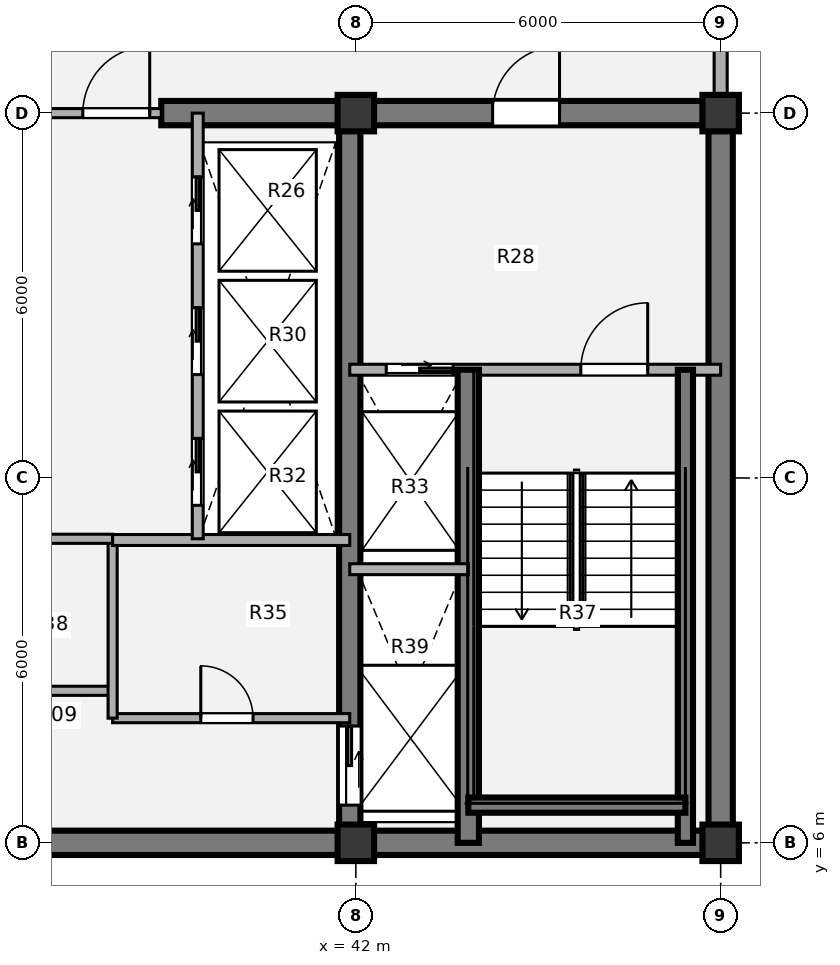
"""IFC4 building model, lengths in metres.
Left out: names, types, materials, properties, quantities, classifications, styles, units other than length and angle.
Written with IfcOpenShell. Run it as: python <this file> out.ifc"""

import sys

from ifc_helpers import new_model, si_unit, direction, frame, frame_2d, origin, origin_2d, place, context, subcontext, project, spatial, rectangle, extrude, source, transform, mapped, element, fill, save


model = new_model("IFC4")
c1 = context("Model", 3, precision=1e-05, world=origin(), true_north=direction((0.0, 1.0)))
c2 = subcontext(c1, "Body", "Model", "MODEL_VIEW")
j1 = project(units=[si_unit("LENGTHUNIT", "METRE"), si_unit("PLANEANGLEUNIT", "RADIAN")], contexts=[c1])
p1 = place(None, origin())
s1 = spatial("IfcSite", under=j1, at=p1, CompositionType="ELEMENT")
p2 = place(p1, origin())
s2 = spatial("IfcBuilding", under=s1, at=p2, CompositionType="ELEMENT")
p3 = place(p2, frame((0.0, 0.0, 260.82)))
s3 = spatial("IfcBuildingStorey", under=s2, at=p3, CompositionType="ELEMENT", Elevation=260.82)
m1 = source(origin(), c2, "Body", "SweptSolid", [
    extrude(rectangle(XDim=0.6, YDim=0.6, at=origin_2d()), origin(), (0.0, 0.0, 1.0), 3.78),
])
for number, where, z_axis, x_axis in (
    (1, (42.0, 6.0, 0.0), (0.0, 0.0, 1.0), (1.0, 0.0, 0.0)),
    (2, (48.0, 6.0, 0.0), (0.0, 0.0, 1.0), (1.0, 0.0, 0.0)),
    (3, (42.0, 18.0, 0.0), (0.0, 0.0, 1.0), (1.0, 0.0, 0.0)),
    (4, (48.0, 18.0, 0.0), (0.0, 0.0, 1.0), (1.0, 0.0, 0.0)),
):
    element("IfcColumn", number, at=place(p3, frame(where, z_axis=z_axis, x_axis=x_axis)), inside=s3, PredefinedType="COLUMN", context=c2, shape_type="MappedRepresentation", body=[
        mapped(m1, transform((0.0, 0.0, 0.0), x_axis=(1.0, 0.0, 0.0), y_axis=(0.0, 1.0, 0.0), z_axis=(0.0, 0.0, 1.0), scale=1.0)),
    ])
p4 = place(p3, frame((48.2, 6.0, 0.0), z_axis=(0.0, 0.0, 1.0), x_axis=(-1.0, 0.0, 0.0)))
e5 = element("IfcWall", 5, at=p4, inside=s3, PredefinedType="SHEAR", context=c2, shape_type="SweptSolid", body=[
    extrude(rectangle(XDim=24.4, YDim=0.4, at=frame_2d((12.2, 0.0))), origin(), (0.0, 0.0, 1.0), 3.78),
])
p5 = place(p3, frame((48.0, 18.0, 0.0), z_axis=(0.0, 0.0, 1.0), x_axis=(0.0, -1.0, 0.0)))
e6 = element("IfcWall", 6, at=p5, inside=s3, PredefinedType="SHEAR", context=c2, shape_type="SweptSolid", body=[
    extrude(rectangle(XDim=12.0, YDim=0.4, at=frame_2d((6.0, 0.0))), origin(), (0.0, 0.0, 1.0), 3.78),
])
p6 = place(p3, frame((38.8, 18.0, 0.0), z_axis=(0.0, 0.0, 1.0), x_axis=(1.0, 0.0, 0.0)))
e7 = element("IfcWall", 7, at=p6, inside=s3, PredefinedType="SHEAR", context=c2, shape_type="SweptSolid", body=[
    extrude(rectangle(XDim=9.4, YDim=0.4, at=frame_2d((4.7, 0.0))), origin(), (0.0, 0.0, 1.0), 3.78),
])
p7 = place(p6, frame((5.45, 0.0, 0.0)))
e8 = element("IfcOpeningElement", 8, at=p7, cuts=e7, PredefinedType="OPENING", context=c2, shape_type="SweptSolid", body=[
    extrude(rectangle(XDim=1.1, YDim=2.1, at=origin_2d()), frame((0.55, 0.21, 1.05), z_axis=(0.0, -1.0, 0.0), x_axis=(1.0, 0.0, 0.0)), (0.0, 0.0, 1.0), 0.42),
])
p8 = place(p3, frame((41.9, 18.0, 0.0), z_axis=(0.0, 0.0, 1.0), x_axis=(0.0, -1.0, 0.0)))
e9 = element("IfcWall", 9, at=p8, inside=s3, PredefinedType="SHEAR", context=c2, shape_type="SweptSolid", body=[
    extrude(rectangle(XDim=12.0, YDim=0.35, at=frame_2d((6.0, 0.0))), origin(), (0.0, 0.0, 1.0), 3.78),
])
p9 = place(p8, frame((10.08, 0.0, 0.0)))
e10 = element("IfcOpeningElement", 10, at=p9, cuts=e9, PredefinedType="OPENING", context=c2, shape_type="SweptSolid", body=[
    extrude(rectangle(XDim=1.3, YDim=2.1, at=origin_2d()), frame((0.65, 0.185, 1.05), z_axis=(0.0, -1.0, 0.0), x_axis=(1.0, 0.0, 0.0)), (0.0, 0.0, 1.0), 0.37),
])
p10 = place(p3, frame((48.0, 21.05, 0.0), z_axis=(0.0, 0.0, 1.0), x_axis=(0.0, -1.0, 0.0)))
e11 = element("IfcWall", 11, at=p10, inside=s3, PredefinedType="SOLIDWALL", context=c2, shape_type="SweptSolid", body=[
    extrude(rectangle(XDim=2.77, YDim=0.215, at=frame_2d((1.385, 0.0))), origin(), (0.0, 0.0, 1.0), 2.718),
])
p11 = place(p3, frame((34.2, 8.5, 0.0), z_axis=(0.0, 0.0, 1.0), x_axis=(1.0, 0.0, 0.0)))
e12 = element("IfcWall", 12, at=p11, inside=s3, PredefinedType="PARTITIONING", context=c2, shape_type="SweptSolid", body=[
    extrude(rectangle(XDim=3.8, YDim=0.15, at=frame_2d((1.9, 0.0))), origin(), (0.0, 0.0, 1.0), 3.5),
])
p12 = place(p3, frame((38.0, 8.05, 0.0), z_axis=(0.0, 0.0, 1.0), x_axis=(1.0, 0.0, 0.0)))
e13 = element("IfcWall", 13, at=p12, inside=s3, PredefinedType="PARTITIONING", context=c2, shape_type="SweptSolid", body=[
    extrude(rectangle(XDim=3.9, YDim=0.15, at=frame_2d((1.95, 0.0))), origin(), (0.0, 0.0, 1.0), 3.5),
])
p13 = place(p12, frame((1.45, 0.0, 0.0)))
e14 = element("IfcOpeningElement", 14, at=p13, cuts=e13, PredefinedType="OPENING", context=c2, shape_type="SweptSolid", body=[
    extrude(rectangle(XDim=0.86, YDim=2.1, at=origin_2d()), frame((0.43, 0.085, 1.05), z_axis=(0.0, -1.0, 0.0), x_axis=(1.0, 0.0, 0.0)), (0.0, 0.0, 1.0), 0.17),
])
p14 = place(p3, frame((38.0, 8.05, 0.0), z_axis=(0.0, 0.0, 1.0), x_axis=(0.0, 1.0, 0.0)))
e15 = element("IfcWall", 15, at=p14, inside=s3, PredefinedType="PARTITIONING", context=c2, shape_type="SweptSolid", body=[
    extrude(rectangle(XDim=2.95, YDim=0.15, at=frame_2d((1.475, 0.0))), origin(), (0.0, 0.0, 1.0), 3.5),
])
p15 = place(p3, frame((34.2, 11.0, 0.0), z_axis=(0.0, 0.0, 1.0), x_axis=(1.0, 0.0, 0.0)))
e16 = element("IfcWall", 16, at=p15, inside=s3, PredefinedType="PARTITIONING", context=c2, shape_type="SweptSolid", body=[
    extrude(rectangle(XDim=3.8, YDim=0.15, at=frame_2d((1.9, 0.0))), origin(), (0.0, 0.0, 1.0), 3.5),
])
p16 = place(p15, frame((1.4, 0.0, 0.0)))
e17 = element("IfcOpeningElement", 17, at=p16, cuts=e16, PredefinedType="OPENING", context=c2, shape_type="SweptSolid", body=[
    extrude(rectangle(XDim=0.86, YDim=2.1, at=origin_2d()), frame((0.43, 0.085, 1.05), z_axis=(0.0, -1.0, 0.0), x_axis=(1.0, 0.0, 0.0)), (0.0, 0.0, 1.0), 0.17),
])
p17 = place(p3, frame((38.0, 10.98, 0.0), z_axis=(0.0, 0.0, 1.0), x_axis=(1.0, 0.0, 0.0)))
e18 = element("IfcWall", 18, at=p17, inside=s3, PredefinedType="PARTITIONING", context=c2, shape_type="SweptSolid", body=[
    extrude(rectangle(XDim=3.9, YDim=0.18, at=frame_2d((1.95, 0.0))), origin(), (0.0, 0.0, 1.0), 3.5),
])
p18 = place(p3, frame((33.2, 18.0, 0.0), z_axis=(0.0, 0.0, 1.0), x_axis=(1.0, 0.0, 0.0)))
e19 = element("IfcWall", 19, at=p18, inside=s3, PredefinedType="PARTITIONING", context=c2, shape_type="SweptSolid", body=[
    extrude(rectangle(XDim=5.6, YDim=0.15, at=frame_2d((2.8, 0.0))), origin(), (0.0, 0.0, 1.0), 2.515),
])
p19 = place(p18, frame((0.19, 0.0, 0.0)))
e20 = element("IfcOpeningElement", 20, at=p19, cuts=e19, PredefinedType="OPENING", context=c2, shape_type="SweptSolid", body=[
    extrude(rectangle(XDim=1.1, YDim=2.1, at=origin_2d()), frame((0.55, 0.085, 1.05), z_axis=(0.0, -1.0, 0.0), x_axis=(1.0, 0.0, 0.0)), (0.0, 0.0, 1.0), 0.17),
])
p20 = place(p18, frame((4.31, 0.0, 0.0)))
e21 = element("IfcOpeningElement", 21, at=p20, cuts=e19, PredefinedType="OPENING", context=c2, shape_type="SweptSolid", body=[
    extrude(rectangle(XDim=1.1, YDim=2.1, at=origin_2d()), frame((0.55, 0.085, 1.05), z_axis=(0.0, -1.0, 0.0), x_axis=(1.0, 0.0, 0.0)), (0.0, 0.0, 1.0), 0.17),
])
p21 = place(p3, frame((41.9, 13.78, 0.0), z_axis=(0.0, 0.0, 1.0), x_axis=(1.0, 0.0, 0.0)))
e22 = element("IfcWall", 22, at=p21, inside=s3, PredefinedType="PARTITIONING", context=c2, shape_type="SweptSolid", body=[
    extrude(rectangle(XDim=6.1, YDim=0.18, at=frame_2d((3.05, 0.0))), origin(), (0.0, 0.0, 1.0), 3.5),
])
p22 = place(p21, frame((0.6, 0.0, 0.0)))
e23 = element("IfcOpeningElement", 23, at=p22, cuts=e22, PredefinedType="OPENING", context=c2, shape_type="SweptSolid", body=[
    extrude(rectangle(XDim=1.1, YDim=2.1, at=origin_2d()), frame((0.55, 0.1, 1.05), z_axis=(0.0, -1.0, 0.0), x_axis=(1.0, 0.0, 0.0)), (0.0, 0.0, 1.0), 0.2),
])
p23 = place(p21, frame((3.8, 0.0, 0.0)))
e24 = element("IfcOpeningElement", 24, at=p23, cuts=e22, PredefinedType="OPENING", context=c2, shape_type="SweptSolid", body=[
    extrude(rectangle(XDim=1.1, YDim=2.1, at=origin_2d()), frame((0.55, 0.1, 1.05), z_axis=(0.0, -1.0, 0.0), x_axis=(1.0, 0.0, 0.0)), (0.0, 0.0, 1.0), 0.2),
])
p24 = place(p3, frame((43.85, 6.0, 0.0), z_axis=(0.0, 0.0, 1.0), x_axis=(0.0, 1.0, 0.0)))
e25 = element("IfcWall", 25, at=p24, inside=s3, PredefinedType="SHEAR", context=c2, shape_type="SweptSolid", body=[
    extrude(rectangle(XDim=7.78, YDim=0.35, at=frame_2d((3.89, 0.0))), origin(), (0.0, 0.0, 1.0), 3.85),
])
p25 = place(p3, frame((47.42, 6.0, 0.0), z_axis=(0.0, 0.0, 1.0), x_axis=(0.0, 1.0, 0.0)))
e26 = element("IfcWall", 26, at=p25, inside=s3, PredefinedType="SHEAR", context=c2, shape_type="SweptSolid", body=[
    extrude(rectangle(XDim=7.78, YDim=0.25, at=frame_2d((3.89, 0.0))), origin(), (0.0, 0.0, 1.0), 3.85),
])
p26 = place(p3, frame((43.85, 6.62, 0.0), z_axis=(0.0, 0.0, 1.0), x_axis=(1.0, 0.0, 0.0)))
e27 = element("IfcWall", 27, at=p26, inside=s3, PredefinedType="SHEAR", context=c2, shape_type="SweptSolid", body=[
    extrude(rectangle(XDim=3.57, YDim=0.25, at=frame_2d((1.785, 0.0))), origin(), (0.0, 0.0, 1.0), 3.85),
])
p27 = place(p3, frame((41.9, 10.5, 0.0), z_axis=(0.0, 0.0, 1.0), x_axis=(1.0, 0.0, 0.0)))
e28 = element("IfcWall", 28, at=p27, inside=s3, PredefinedType="PARTITIONING", context=c2, shape_type="SweptSolid", body=[
    extrude(rectangle(XDim=1.95, YDim=0.18, at=frame_2d((0.975, 0.0))), origin(), (0.0, 0.0, 1.0), 3.5),
])
p28 = place(p3, frame((39.4, 11.0, 0.0), z_axis=(0.0, 0.0, 1.0), x_axis=(0.0, 1.0, 0.0)))
e29 = element("IfcWall", 29, at=p28, inside=s3, PredefinedType="PARTITIONING", context=c2, shape_type="SweptSolid", body=[
    extrude(rectangle(XDim=7.0, YDim=0.18, at=frame_2d((3.5, 0.0))), origin(), (0.0, 0.0, 1.0), 3.5),
])
p29 = place(p28, frame((0.55, 0.0, 0.0)))
e30 = element("IfcOpeningElement", 30, at=p29, cuts=e29, PredefinedType="OPENING", context=c2, shape_type="SweptSolid", body=[
    extrude(rectangle(XDim=1.1, YDim=2.1, at=origin_2d()), frame((0.55, 0.1, 1.05), z_axis=(0.0, -1.0, 0.0), x_axis=(1.0, 0.0, 0.0)), (0.0, 0.0, 1.0), 0.2),
])
p30 = place(p28, frame((2.7, 0.0, 0.0)))
e31 = element("IfcOpeningElement", 31, at=p30, cuts=e29, PredefinedType="OPENING", context=c2, shape_type="SweptSolid", body=[
    extrude(rectangle(XDim=1.1, YDim=2.1, at=origin_2d()), frame((0.55, 0.1, 1.05), z_axis=(0.0, -1.0, 0.0), x_axis=(1.0, 0.0, 0.0)), (0.0, 0.0, 1.0), 0.2),
])
p31 = place(p28, frame((4.85, 0.0, 0.0)))
e32 = element("IfcOpeningElement", 32, at=p31, cuts=e29, PredefinedType="OPENING", context=c2, shape_type="SweptSolid", body=[
    extrude(rectangle(XDim=1.1, YDim=2.1, at=origin_2d()), frame((0.55, 0.1, 1.05), z_axis=(0.0, -1.0, 0.0), x_axis=(1.0, 0.0, 0.0)), (0.0, 0.0, 1.0), 0.2),
])
m2 = source(origin(), c2, "Body", "SweptSolid", [
    extrude(rectangle(XDim=0.86, YDim=2.1, at=origin_2d()), frame((0.43, 0.025, 1.05), z_axis=(0.0, -1.0, 0.0), x_axis=(1.0, 0.0, 0.0)), (0.0, 0.0, 1.0), 0.05),
])
p32 = place(p13, origin())
e33 = element("IfcDoor", 33, at=p32, inside=s3, OperationType="SINGLE_SWING_LEFT", PredefinedType="DOOR", context=c2, shape_type="MappedRepresentation", body=[
    mapped(m2, transform((0.0, 0.0, 0.0), x_axis=(1.0, 0.0, 0.0), y_axis=(0.0, 1.0, 0.0), z_axis=(0.0, 0.0, 1.0), scale=1.0)),
])
fill(e14, e33)
m3 = source(origin(), c2, "Body", "SweptSolid", [
    extrude(rectangle(XDim=1.1, YDim=2.1, at=origin_2d()), frame((0.55, 0.025, 1.05), z_axis=(0.0, -1.0, 0.0), x_axis=(1.0, 0.0, 0.0)), (0.0, 0.0, 1.0), 0.05),
])
p33 = place(p20, origin())
e34 = element("IfcDoor", 34, at=p33, inside=s3, OperationType="SINGLE_SWING_RIGHT", PredefinedType="DOOR", context=c2, shape_type="MappedRepresentation", body=[
    mapped(m3, transform((0.0, 0.0, 0.0), x_axis=(1.0, 0.0, 0.0), y_axis=(0.0, 1.0, 0.0), z_axis=(0.0, 0.0, 1.0), scale=1.0)),
])
fill(e21, e34)
m4 = source(origin(), c2, "Body", "SweptSolid", [
    extrude(rectangle(XDim=1.1, YDim=2.1, at=origin_2d()), frame((0.55, 0.025, 1.05), z_axis=(0.0, -1.0, 0.0), x_axis=(1.0, 0.0, 0.0)), (0.0, 0.0, 1.0), 0.05),
])
p34 = place(p22, origin())
e35 = element("IfcDoor", 35, at=p34, inside=s3, OperationType="SLIDING_TO_RIGHT", PredefinedType="DOOR", context=c2, shape_type="MappedRepresentation", body=[
    mapped(m4, transform((0.0, 0.0, 0.0), x_axis=(1.0, 0.0, 0.0), y_axis=(0.0, 1.0, 0.0), z_axis=(0.0, 0.0, 1.0), scale=1.0)),
])
fill(e23, e35)
m5 = source(origin(), c2, "Body", "SweptSolid", [
    extrude(rectangle(XDim=1.1, YDim=2.1, at=origin_2d()), frame((0.55, 0.025, 1.05), z_axis=(0.0, -1.0, 0.0), x_axis=(1.0, 0.0, 0.0)), (0.0, 0.0, 1.0), 0.05),
])
p35 = place(p23, origin())
e36 = element("IfcDoor", 36, at=p35, inside=s3, OperationType="SINGLE_SWING_RIGHT", PredefinedType="DOOR", context=c2, shape_type="MappedRepresentation", body=[
    mapped(m5, transform((0.0, 0.0, 0.0), x_axis=(1.0, 0.0, 0.0), y_axis=(0.0, 1.0, 0.0), z_axis=(0.0, 0.0, 1.0), scale=1.0)),
])
fill(e24, e36)
m6 = source(origin(), c2, "Body", "SweptSolid", [
    extrude(rectangle(XDim=1.3, YDim=2.1, at=origin_2d()), frame((0.65, 0.025, 1.05), z_axis=(0.0, -1.0, 0.0), x_axis=(1.0, 0.0, 0.0)), (0.0, 0.0, 1.0), 0.05),
])
p36 = place(p9, origin())
e37 = element("IfcDoor", 37, at=p36, inside=s3, OperationType="SLIDING_TO_LEFT", PredefinedType="DOOR", context=c2, shape_type="MappedRepresentation", body=[
    mapped(m6, transform((0.0, 0.0, 0.0), x_axis=(1.0, 0.0, 0.0), y_axis=(0.0, 1.0, 0.0), z_axis=(0.0, 0.0, 1.0), scale=1.0)),
])
fill(e10, e37)
p37 = place(p7, origin())
e38 = element("IfcDoor", 38, at=p37, inside=s3, OperationType="SINGLE_SWING_RIGHT", PredefinedType="DOOR", context=c2, shape_type="MappedRepresentation", body=[
    mapped(m3, transform((0.0, 0.0, 0.0), x_axis=(1.0, 0.0, 0.0), y_axis=(0.0, 1.0, 0.0), z_axis=(0.0, 0.0, 1.0), scale=1.0)),
])
fill(e8, e38)
p38 = place(p29, origin())
e39 = element("IfcDoor", 39, at=p38, inside=s3, OperationType="SLIDING_TO_RIGHT", PredefinedType="DOOR", context=c2, shape_type="MappedRepresentation", body=[
    mapped(m4, transform((0.0, 0.0, 0.0), x_axis=(1.0, 0.0, 0.0), y_axis=(0.0, 1.0, 0.0), z_axis=(0.0, 0.0, 1.0), scale=1.0)),
])
fill(e30, e39)
p39 = place(p30, origin())
e40 = element("IfcDoor", 40, at=p39, inside=s3, OperationType="SLIDING_TO_RIGHT", PredefinedType="DOOR", context=c2, shape_type="MappedRepresentation", body=[
    mapped(m4, transform((0.0, 0.0, 0.0), x_axis=(1.0, 0.0, 0.0), y_axis=(0.0, 1.0, 0.0), z_axis=(0.0, 0.0, 1.0), scale=1.0)),
])
fill(e31, e40)
p40 = place(p31, origin())
e41 = element("IfcDoor", 41, at=p40, inside=s3, OperationType="SLIDING_TO_RIGHT", PredefinedType="DOOR", context=c2, shape_type="MappedRepresentation", body=[
    mapped(m4, transform((0.0, 0.0, 0.0), x_axis=(1.0, 0.0, 0.0), y_axis=(0.0, 1.0, 0.0), z_axis=(0.0, 0.0, 1.0), scale=1.0)),
])
fill(e32, e41)
save(model, sys.argv[1])
